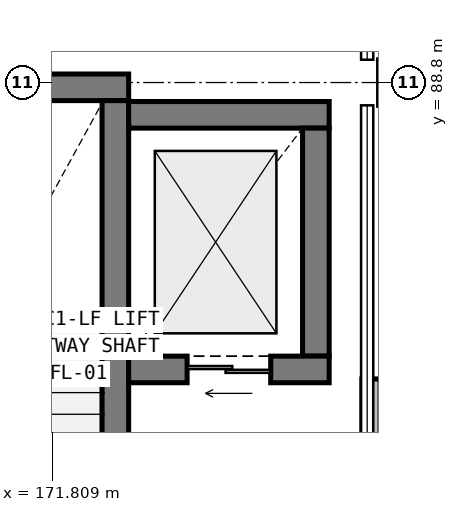
"""IFC4 building model, lengths in metres.
Left out: names, types, materials, properties, quantities, classifications, styles, units other than length and angle.
Written with IfcOpenShell. Run it as: python <this file> out.ifc"""

import sys

from ifc_helpers import new_model, si_unit, direction, frame, frame_2d, origin, origin_2d, place, context, subcontext, project, spatial, rectangle, extrude, element, fill, save


model = new_model("IFC4")
c1 = context("Model", 3, precision=1e-05, world=origin(), true_north=direction((0.0, 1.0)))
c2 = subcontext(c1, "Body", "Model", "MODEL_VIEW")
j1 = project(units=[si_unit("LENGTHUNIT", "METRE"), si_unit("PLANEANGLEUNIT", "RADIAN")], contexts=[c1])
p1 = place(None, origin())
s1 = spatial("IfcSite", under=j1, at=p1, CompositionType="ELEMENT")
p2 = place(p1, origin())
s2 = spatial("IfcBuilding", under=s1, at=p2, CompositionType="ELEMENT")
p3 = place(p2, frame((0.0, 0.0, 27.0)))
s3 = spatial("IfcBuildingStorey", under=s2, at=p3, CompositionType="ELEMENT", Elevation=27.0)
p4 = place(p3, frame((176.4, 88.8, 0.0), z_axis=(0.0, 0.0, 1.0), x_axis=(1.0, 0.0, 0.0)))
e1 = element("IfcColumn", 1, at=p4, inside=s3, PredefinedType="COLUMN", context=c2, shape_type="SweptSolid", body=[
    extrude(rectangle(XDim=0.6, YDim=0.6, at=origin_2d()), origin(), (0.0, 0.0, 1.0), 5.4),
])
p5 = place(p3, frame((168.188, 88.737, 0.0), z_axis=(0.0, 0.0, 1.0), x_axis=(1.0, 0.0, 0.0)))
e2 = element("IfcWall", 2, at=p5, inside=s3, PredefinedType="SHEAR", context=c2, shape_type="SweptSolid", body=[
    extrude(rectangle(XDim=4.624, YDim=0.35, at=frame_2d((2.312, 0.0))), origin(), (0.0, 0.0, 1.0), 5.1),
])
p6 = place(p3, frame((172.637, 88.562, 0.0), z_axis=(0.0, 0.0, 1.0), x_axis=(0.0, -1.0, 0.0)))
e3 = element("IfcWall", 3, at=p6, inside=s3, PredefinedType="SHEAR", context=c2, shape_type="SweptSolid", body=[
    extrude(rectangle(XDim=9.124, YDim=0.35, at=frame_2d((4.562, 0.0))), origin(), (0.0, 0.0, 1.0), 5.1),
])
p7 = place(p3, frame((172.812, 88.375, 0.0), z_axis=(0.0, 0.0, 1.0), x_axis=(1.0, 0.0, 0.0)))
e4 = element("IfcWall", 4, at=p7, inside=s3, PredefinedType="SHEAR", context=c2, shape_type="SweptSolid", body=[
    extrude(rectangle(XDim=2.638, YDim=0.35, at=frame_2d((1.319, 0.0))), origin(), (0.0, 0.0, 1.0), 5.1),
])
p8 = place(p3, frame((175.275, 88.2, 0.0), z_axis=(0.0, 0.0, 1.0), x_axis=(0.0, -1.0, 0.0)))
e5 = element("IfcWall", 5, at=p8, inside=s3, PredefinedType="SHEAR", context=c2, shape_type="SweptSolid", body=[
    extrude(rectangle(XDim=3.0, YDim=0.35, at=frame_2d((1.5, 0.0))), origin(), (0.0, 0.0, 1.0), 5.1),
])
p9 = place(p3, frame((175.45, 85.025, 0.0), z_axis=(0.0, 0.0, 1.0), x_axis=(-1.0, 0.0, 0.0)))
e6 = element("IfcWall", 6, at=p9, inside=s3, PredefinedType="SHEAR", context=c2, shape_type="SweptSolid", body=[
    extrude(rectangle(XDim=2.638, YDim=0.35, at=frame_2d((1.319, 0.0))), origin(), (0.0, 0.0, 1.0), 5.1),
])
p10 = place(p9, frame((0.769, 0.0, 0.0)))
e7 = element("IfcOpeningElement", 7, at=p10, cuts=e6, PredefinedType="OPENING", context=c2, shape_type="SweptSolid", body=[
    extrude(rectangle(XDim=1.1, YDim=2.2, at=frame_2d((0.55, 1.1))), frame((0.0, 0.185, 0.0), z_axis=(0.0, -1.0, 0.0), x_axis=(1.0, 0.0, 0.0)), (0.0, 0.0, 1.0), 0.37),
])
p11 = place(p3, frame((176.0, 84.9, 0.0), z_axis=(0.0, 0.0, 1.0), x_axis=(0.0, -1.0, 0.0)))
e8 = element("IfcWall", 8, at=p11, inside=s3, PredefinedType="PARTITIONING", context=c2, shape_type="SweptSolid", body=[
    extrude(rectangle(XDim=5.5, YDim=0.24, at=frame_2d((2.75, 0.0))), origin(), (0.0, 0.0, 1.0), 4.465),
])
p12 = place(p10, origin())
e9 = element("IfcDoor", 9, at=p12, inside=s3, OperationType="DOUBLE_DOOR_SLIDING", PredefinedType="DOOR", context=c2, shape_type="SweptSolid", body=[
    extrude(rectangle(XDim=1.1, YDim=2.2, at=frame_2d((0.55, 1.1))), frame((0.0, 0.025, 0.0), z_axis=(0.0, -1.0, 0.0), x_axis=(1.0, 0.0, 0.0)), (0.0, 0.0, 1.0), 0.05),
])
fill(e7, e9)
save(model, sys.argv[1])
